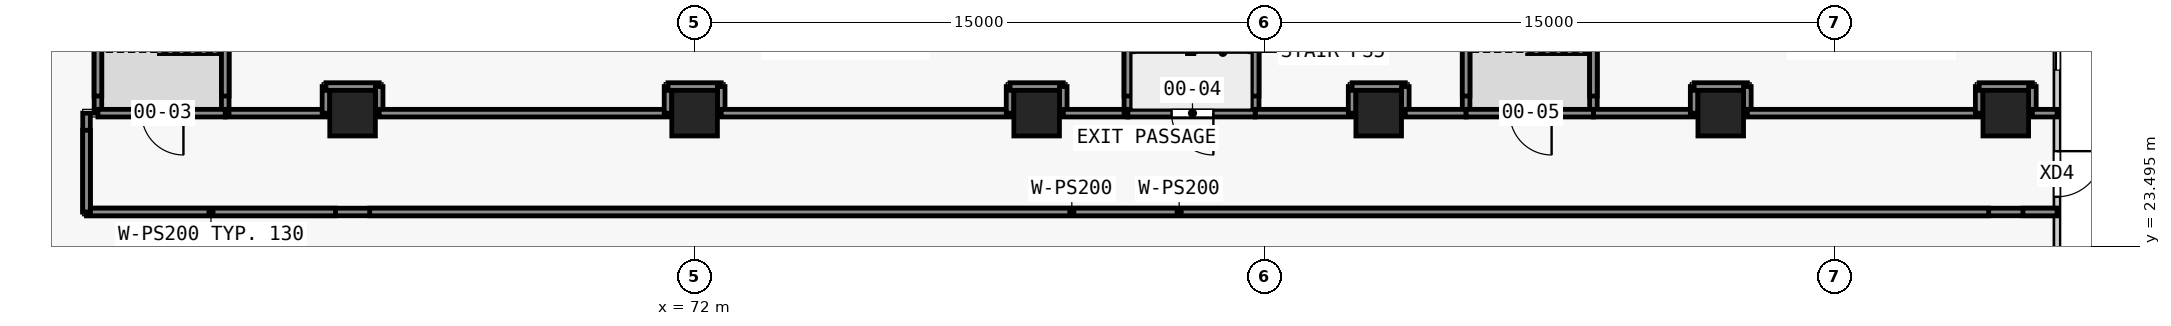
"""IFC4 building model, lengths in metres.
Left out: names, types, materials, properties, quantities, classifications, styles, units other than length and angle.
Written with IfcOpenShell. Run it as: python <this file> out.ifc"""

import sys

from ifc_helpers import new_model, si_unit, direction, frame, frame_2d, origin, origin_2d, place, context, subcontext, project, spatial, rectangle, extrude, element, fill, save


model = new_model("IFC4")
c1 = context("Model", 3, precision=1e-05, world=origin(), true_north=direction((0.0, 1.0)))
c2 = subcontext(c1, "Body", "Model", "MODEL_VIEW")
j1 = project(units=[si_unit("LENGTHUNIT", "METRE"), si_unit("PLANEANGLEUNIT", "RADIAN")], contexts=[c1])
p1 = place(None, origin())
s1 = spatial("IfcSite", under=j1, at=p1, CompositionType="ELEMENT")
p2 = place(p1, origin())
s2 = spatial("IfcBuilding", under=s1, at=p2, CompositionType="ELEMENT")
p3 = place(p2, origin())
s3 = spatial("IfcBuildingStorey", under=s2, at=p3, CompositionType="ELEMENT", Elevation=0.0)
for number, where, z_axis, x_axis in (
    (1, (63.0, 27.0, 0.0), (0.0, 0.0, 1.0), (1.0, 0.0, 0.0)),
    (2, (72.0, 27.0, 0.0), (0.0, 0.0, 1.0), (1.0, 0.0, 0.0)),
    (3, (81.0, 27.0, 0.0), (0.0, 0.0, 1.0), (1.0, 0.0, 0.0)),
    (4, (90.0, 27.0, 0.0), (0.0, 0.0, 1.0), (1.0, 0.0, 0.0)),
    (5, (99.0, 27.0, 0.0), (0.0, 0.0, 1.0), (1.0, 0.0, 0.0)),
    (6, (106.5, 27.0, 0.0), (0.0, 0.0, 1.0), (1.0, 0.0, 0.0)),
):
    element("IfcColumn", number, at=place(p3, frame(where, z_axis=z_axis, x_axis=x_axis)), inside=s3, PredefinedType="COLUMN", context=c2, shape_type="SweptSolid", body=[
        extrude(rectangle(XDim=1.2, YDim=1.2, at=origin_2d()), origin(), (0.0, 0.0, 1.0), 8.0),
    ])
p4 = place(p3, frame((107.85, 34.375, 0.0), z_axis=(0.0, 0.0, 1.0), x_axis=(0.0, -1.0, 0.0)))
e7 = element("IfcWall", 7, at=p4, inside=s3, PredefinedType="STANDARD", context=c2, shape_type="SweptSolid", body=[
    extrude(rectangle(XDim=13.485, YDim=0.16, at=frame_2d((6.743, 0.0))), origin(), (0.0, 0.0, 1.0), 7.65),
])
p5 = place(p4, frame((0.242, 0.0, 0.0)))
e8 = element("IfcOpeningElement", 8, at=p5, cuts=e7, PredefinedType="OPENING", context=c2, shape_type="SweptSolid", body=[
    extrude(rectangle(XDim=3.0, YDim=3.0, at=frame_2d((1.5, 1.5))), frame((0.0, 0.09, 0.0), z_axis=(0.0, -1.0, 0.0), x_axis=(1.0, 0.0, 0.0)), (0.0, 0.0, 1.0), 0.18),
])
p6 = place(p4, frame((3.242, 0.0, 0.0)))
e9 = element("IfcOpeningElement", 9, at=p6, cuts=e7, PredefinedType="OPENING", context=c2, shape_type="SweptSolid", body=[
    extrude(rectangle(XDim=3.0, YDim=3.0, at=frame_2d((1.5, 1.5))), frame((0.0, 0.09, 0.0), z_axis=(0.0, -1.0, 0.0), x_axis=(1.0, 0.0, 0.0)), (0.0, 0.0, 1.0), 0.18),
])
p7 = place(p4, frame((8.375, 0.0, 0.0)))
e10 = element("IfcOpeningElement", 10, at=p7, cuts=e7, PredefinedType="OPENING", context=c2, shape_type="SweptSolid", body=[
    extrude(rectangle(XDim=1.2, YDim=2.4, at=frame_2d((0.6, 1.2))), frame((0.0, 0.09, 0.0), z_axis=(0.0, -1.0, 0.0), x_axis=(1.0, 0.0, 0.0)), (0.0, 0.0, 1.0), 0.18),
])
p8 = place(p3, frame((107.85, 24.4, 0.0), z_axis=(0.0, 0.0, 1.0), x_axis=(-1.0, 0.0, 0.0)))
e11 = element("IfcWall", 11, at=p8, inside=s3, PredefinedType="PARTITIONING", context=c2, shape_type="SweptSolid", body=[
    extrude(rectangle(XDim=51.85, YDim=0.2, at=frame_2d((25.925, 0.0))), origin(), (0.0, 0.0, 1.0), 6.95),
])
p9 = place(p3, frame((59.65, 27.0, 0.0), z_axis=(0.0, 0.0, 1.0), x_axis=(1.0, 0.0, 0.0)))
e12 = element("IfcWall", 12, at=p9, inside=s3, PredefinedType="PARTITIONING", context=c2, shape_type="SweptSolid", body=[
    extrude(rectangle(XDim=2.65, YDim=0.2, at=frame_2d((1.325, 0.0))), origin(), (0.0, 0.0, 1.0), 6.95),
])
p10 = place(p3, frame((62.3, 27.0, 0.0), z_axis=(0.0, 0.0, 1.0), x_axis=(0.0, 1.0, 0.0)))
e13 = element("IfcWall", 13, at=p10, inside=s3, PredefinedType="PARTITIONING", context=c2, shape_type="SweptSolid", body=[
    extrude(rectangle(XDim=0.7, YDim=0.2, at=frame_2d((0.35, 0.0))), origin(), (0.0, 0.0, 1.0), 6.95),
])
p11 = place(p3, frame((62.3, 27.7, 0.0), z_axis=(0.0, 0.0, 1.0), x_axis=(1.0, 0.0, 0.0)))
e14 = element("IfcWall", 14, at=p11, inside=s3, PredefinedType="PARTITIONING", context=c2, shape_type="SweptSolid", body=[
    extrude(rectangle(XDim=1.4, YDim=0.2, at=frame_2d((0.7, 0.0))), origin(), (0.0, 0.0, 1.0), 6.95),
])
p12 = place(p3, frame((63.7, 27.7, 0.0), z_axis=(0.0, 0.0, 1.0), x_axis=(0.0, -1.0, 0.0)))
e15 = element("IfcWall", 15, at=p12, inside=s3, PredefinedType="PARTITIONING", context=c2, shape_type="SweptSolid", body=[
    extrude(rectangle(XDim=0.7, YDim=0.2, at=frame_2d((0.35, 0.0))), origin(), (0.0, 0.0, 1.0), 6.95),
])
p13 = place(p3, frame((63.7, 27.0, 0.0), z_axis=(0.0, 0.0, 1.0), x_axis=(1.0, 0.0, 0.0)))
e16 = element("IfcWall", 16, at=p13, inside=s3, PredefinedType="PARTITIONING", context=c2, shape_type="SweptSolid", body=[
    extrude(rectangle(XDim=7.6, YDim=0.2, at=frame_2d((3.8, 0.0))), origin(), (0.0, 0.0, 1.0), 6.95),
])
p14 = place(p3, frame((71.3, 27.0, 0.0), z_axis=(0.0, 0.0, 1.0), x_axis=(0.0, 1.0, 0.0)))
e17 = element("IfcWall", 17, at=p14, inside=s3, PredefinedType="PARTITIONING", context=c2, shape_type="SweptSolid", body=[
    extrude(rectangle(XDim=0.7, YDim=0.2, at=frame_2d((0.35, 0.0))), origin(), (0.0, 0.0, 1.0), 6.95),
])
p15 = place(p3, frame((71.3, 27.7, 0.0), z_axis=(0.0, 0.0, 1.0), x_axis=(1.0, 0.0, 0.0)))
e18 = element("IfcWall", 18, at=p15, inside=s3, PredefinedType="PARTITIONING", context=c2, shape_type="SweptSolid", body=[
    extrude(rectangle(XDim=1.4, YDim=0.2, at=frame_2d((0.7, 0.0))), origin(), (0.0, 0.0, 1.0), 6.95),
])
p16 = place(p3, frame((72.7, 27.7, 0.0), z_axis=(0.0, 0.0, 1.0), x_axis=(0.0, -1.0, 0.0)))
e19 = element("IfcWall", 19, at=p16, inside=s3, PredefinedType="PARTITIONING", context=c2, shape_type="SweptSolid", body=[
    extrude(rectangle(XDim=0.7, YDim=0.2, at=frame_2d((0.35, 0.0))), origin(), (0.0, 0.0, 1.0), 6.95),
])
p17 = place(p3, frame((72.7, 27.0, 0.0), z_axis=(0.0, 0.0, 1.0), x_axis=(1.0, 0.0, 0.0)))
e20 = element("IfcWall", 20, at=p17, inside=s3, PredefinedType="PARTITIONING", context=c2, shape_type="SweptSolid", body=[
    extrude(rectangle(XDim=7.6, YDim=0.2, at=frame_2d((3.8, 0.0))), origin(), (0.0, 0.0, 1.0), 6.95),
])
p18 = place(p3, frame((80.3, 27.0, 0.0), z_axis=(0.0, 0.0, 1.0), x_axis=(0.0, 1.0, 0.0)))
e21 = element("IfcWall", 21, at=p18, inside=s3, PredefinedType="PARTITIONING", context=c2, shape_type="SweptSolid", body=[
    extrude(rectangle(XDim=0.7, YDim=0.2, at=frame_2d((0.35, 0.0))), origin(), (0.0, 0.0, 1.0), 6.95),
])
p19 = place(p3, frame((80.3, 27.7, 0.0), z_axis=(0.0, 0.0, 1.0), x_axis=(1.0, 0.0, 0.0)))
e22 = element("IfcWall", 22, at=p19, inside=s3, PredefinedType="PARTITIONING", context=c2, shape_type="SweptSolid", body=[
    extrude(rectangle(XDim=1.4, YDim=0.2, at=frame_2d((0.7, 0.0))), origin(), (0.0, 0.0, 1.0), 6.95),
])
p20 = place(p3, frame((81.7, 27.7, 0.0), z_axis=(0.0, 0.0, 1.0), x_axis=(0.0, -1.0, 0.0)))
e23 = element("IfcWall", 23, at=p20, inside=s3, PredefinedType="PARTITIONING", context=c2, shape_type="SweptSolid", body=[
    extrude(rectangle(XDim=0.7, YDim=0.2, at=frame_2d((0.35, 0.0))), origin(), (0.0, 0.0, 1.0), 6.95),
])
p21 = place(p3, frame((81.7, 27.0, 0.0), z_axis=(0.0, 0.0, 1.0), x_axis=(1.0, 0.0, 0.0)))
e24 = element("IfcWall", 24, at=p21, inside=s3, PredefinedType="PARTITIONING", context=c2, shape_type="SweptSolid", body=[
    extrude(rectangle(XDim=1.7, YDim=0.2, at=frame_2d((0.85, 0.0))), origin(), (0.0, 0.0, 1.0), 6.95),
])
for number, where, z_axis, x_axis in (
    (25, (56.3, 27.0, 0.0), (0.0, 0.0, 1.0), (0.0, 1.0, 0.0)),
    (26, (59.65, 33.9, 0.0), (0.0, 0.0, 1.0), (0.0, -1.0, 0.0)),
    (27, (92.3, 27.0, 0.0), (0.0, 0.0, 1.0), (0.0, 1.0, 0.0)),
    (28, (95.65, 33.9, 0.0), (0.0, 0.0, 1.0), (0.0, -1.0, 0.0)),
    (29, (83.4, 27.0, 0.0), (0.0, 0.0, 1.0), (0.0, 1.0, 0.0)),
    (30, (86.75, 33.9, 0.0), (0.0, 0.0, 1.0), (0.0, -1.0, 0.0)),
):
    element("IfcWall", number, at=place(p3, frame(where, z_axis=z_axis, x_axis=x_axis)), inside=s3, PredefinedType="PARTITIONING", context=c2, shape_type="SweptSolid", body=[
        extrude(rectangle(XDim=6.9, YDim=0.2, at=frame_2d((3.45, 0.0))), origin(), (0.0, 0.0, 1.0), 6.95),
    ])
p22 = place(p3, frame((95.65, 27.0, 0.0), z_axis=(0.0, 0.0, 1.0), x_axis=(1.0, 0.0, 0.0)))
e31 = element("IfcWall", 31, at=p22, inside=s3, PredefinedType="PARTITIONING", context=c2, shape_type="SweptSolid", body=[
    extrude(rectangle(XDim=2.65, YDim=0.2, at=frame_2d((1.325, 0.0))), origin(), (0.0, 0.0, 1.0), 6.95),
])
p23 = place(p3, frame((98.3, 27.0, 0.0), z_axis=(0.0, 0.0, 1.0), x_axis=(0.0, 1.0, 0.0)))
e32 = element("IfcWall", 32, at=p23, inside=s3, PredefinedType="PARTITIONING", context=c2, shape_type="SweptSolid", body=[
    extrude(rectangle(XDim=0.7, YDim=0.2, at=frame_2d((0.35, 0.0))), origin(), (0.0, 0.0, 1.0), 6.95),
])
p24 = place(p3, frame((98.3, 27.7, 0.0), z_axis=(0.0, 0.0, 1.0), x_axis=(1.0, 0.0, 0.0)))
e33 = element("IfcWall", 33, at=p24, inside=s3, PredefinedType="PARTITIONING", context=c2, shape_type="SweptSolid", body=[
    extrude(rectangle(XDim=1.4, YDim=0.2, at=frame_2d((0.7, 0.0))), origin(), (0.0, 0.0, 1.0), 6.95),
])
p25 = place(p3, frame((99.7, 27.7, 0.0), z_axis=(0.0, 0.0, 1.0), x_axis=(0.0, -1.0, 0.0)))
e34 = element("IfcWall", 34, at=p25, inside=s3, PredefinedType="PARTITIONING", context=c2, shape_type="SweptSolid", body=[
    extrude(rectangle(XDim=0.7, YDim=0.2, at=frame_2d((0.35, 0.0))), origin(), (0.0, 0.0, 1.0), 6.95),
])
p26 = place(p3, frame((99.7, 27.0, 0.0), z_axis=(0.0, 0.0, 1.0), x_axis=(1.0, 0.0, 0.0)))
e35 = element("IfcWall", 35, at=p26, inside=s3, PredefinedType="PARTITIONING", context=c2, shape_type="SweptSolid", body=[
    extrude(rectangle(XDim=6.1, YDim=0.2, at=frame_2d((3.05, 0.0))), origin(), (0.0, 0.0, 1.0), 6.95),
])
p27 = place(p3, frame((105.8, 27.0, 0.0), z_axis=(0.0, 0.0, 1.0), x_axis=(0.0, 1.0, 0.0)))
e36 = element("IfcWall", 36, at=p27, inside=s3, PredefinedType="PARTITIONING", context=c2, shape_type="SweptSolid", body=[
    extrude(rectangle(XDim=0.7, YDim=0.2, at=frame_2d((0.35, 0.0))), origin(), (0.0, 0.0, 1.0), 6.95),
])
p28 = place(p3, frame((105.8, 27.7, 0.0), z_axis=(0.0, 0.0, 1.0), x_axis=(1.0, 0.0, 0.0)))
e37 = element("IfcWall", 37, at=p28, inside=s3, PredefinedType="PARTITIONING", context=c2, shape_type="SweptSolid", body=[
    extrude(rectangle(XDim=1.4, YDim=0.2, at=frame_2d((0.7, 0.0))), origin(), (0.0, 0.0, 1.0), 6.95),
])
p29 = place(p3, frame((107.2, 27.7, 0.0), z_axis=(0.0, 0.0, 1.0), x_axis=(0.0, -1.0, 0.0)))
e38 = element("IfcWall", 38, at=p29, inside=s3, PredefinedType="PARTITIONING", context=c2, shape_type="SweptSolid", body=[
    extrude(rectangle(XDim=0.7, YDim=0.2, at=frame_2d((0.35, 0.0))), origin(), (0.0, 0.0, 1.0), 7.65),
])
p30 = place(p3, frame((107.2, 27.0, 0.0), z_axis=(0.0, 0.0, 1.0), x_axis=(1.0, 0.0, 0.0)))
e39 = element("IfcWall", 39, at=p30, inside=s3, PredefinedType="PARTITIONING", context=c2, shape_type="SweptSolid", body=[
    extrude(rectangle(XDim=0.65, YDim=0.2, at=frame_2d((0.325, 0.0))), origin(), (0.0, 0.0, 1.0), 7.65),
])
p31 = place(p3, frame((86.75, 27.0, 0.0), z_axis=(0.0, 0.0, 1.0), x_axis=(1.0, 0.0, 0.0)))
e40 = element("IfcWall", 40, at=p31, inside=s3, PredefinedType="PARTITIONING", context=c2, shape_type="SweptSolid", body=[
    extrude(rectangle(XDim=2.55, YDim=0.2, at=frame_2d((1.275, 0.0))), origin(), (0.0, 0.0, 1.0), 6.95),
])
p32 = place(p3, frame((89.3, 27.0, 0.0), z_axis=(0.0, 0.0, 1.0), x_axis=(0.0, 1.0, 0.0)))
e41 = element("IfcWall", 41, at=p32, inside=s3, PredefinedType="PARTITIONING", context=c2, shape_type="SweptSolid", body=[
    extrude(rectangle(XDim=0.7, YDim=0.2, at=frame_2d((0.35, 0.0))), origin(), (0.0, 0.0, 1.0), 6.95),
])
p33 = place(p3, frame((89.3, 27.7, 0.0), z_axis=(0.0, 0.0, 1.0), x_axis=(1.0, 0.0, 0.0)))
e42 = element("IfcWall", 42, at=p33, inside=s3, PredefinedType="PARTITIONING", context=c2, shape_type="SweptSolid", body=[
    extrude(rectangle(XDim=1.4, YDim=0.2, at=frame_2d((0.7, 0.0))), origin(), (0.0, 0.0, 1.0), 6.95),
])
p34 = place(p3, frame((90.7, 27.7, 0.0), z_axis=(0.0, 0.0, 1.0), x_axis=(0.0, -1.0, 0.0)))
e43 = element("IfcWall", 43, at=p34, inside=s3, PredefinedType="PARTITIONING", context=c2, shape_type="SweptSolid", body=[
    extrude(rectangle(XDim=0.7, YDim=0.2, at=frame_2d((0.35, 0.0))), origin(), (0.0, 0.0, 1.0), 6.95),
])
p35 = place(p3, frame((90.7, 27.0, 0.0), z_axis=(0.0, 0.0, 1.0), x_axis=(1.0, 0.0, 0.0)))
e44 = element("IfcWall", 44, at=p35, inside=s3, PredefinedType="PARTITIONING", context=c2, shape_type="SweptSolid", body=[
    extrude(rectangle(XDim=1.6, YDim=0.2, at=frame_2d((0.8, 0.0))), origin(), (0.0, 0.0, 1.0), 6.95),
])
p36 = place(p3, frame((86.75, 27.0, 0.0), z_axis=(0.0, 0.0, 1.0), x_axis=(-1.0, 0.0, 0.0)))
e45 = element("IfcWall", 45, at=p36, inside=s3, PredefinedType="PARTITIONING", context=c2, shape_type="SweptSolid", body=[
    extrude(rectangle(XDim=3.35, YDim=0.2, at=frame_2d((1.675, 0.0))), origin(), (0.0, 0.0, 1.0), 6.95),
])
p37 = place(p36, frame((1.1, 0.0, 0.0)))
e46 = element("IfcOpeningElement", 46, at=p37, cuts=e45, PredefinedType="OPENING", context=c2, shape_type="SweptSolid", body=[
    extrude(rectangle(XDim=1.1, YDim=2.1, at=frame_2d((0.55, 1.05))), frame((0.0, 0.11, 0.0), z_axis=(0.0, -1.0, 0.0), x_axis=(1.0, 0.0, 0.0)), (0.0, 0.0, 1.0), 0.22),
])
p38 = place(p3, frame((59.65, 27.0, 0.0), z_axis=(0.0, 0.0, 1.0), x_axis=(-1.0, 0.0, 0.0)))
e47 = element("IfcWall", 47, at=p38, inside=s3, PredefinedType="PARTITIONING", context=c2, shape_type="SweptSolid", body=[
    extrude(rectangle(XDim=3.35, YDim=0.2, at=frame_2d((1.675, 0.0))), origin(), (0.0, 0.0, 1.0), 6.95),
])
p39 = place(p38, frame((1.1, 0.0, 0.0)))
e48 = element("IfcOpeningElement", 48, at=p39, cuts=e47, PredefinedType="OPENING", context=c2, shape_type="SweptSolid", body=[
    extrude(rectangle(XDim=1.1, YDim=2.1, at=frame_2d((0.55, 1.05))), frame((0.0, 0.11, 0.0), z_axis=(0.0, -1.0, 0.0), x_axis=(1.0, 0.0, 0.0)), (0.0, 0.0, 1.0), 0.22),
])
p40 = place(p3, frame((95.65, 27.0, 0.0), z_axis=(0.0, 0.0, 1.0), x_axis=(-1.0, 0.0, 0.0)))
e49 = element("IfcWall", 49, at=p40, inside=s3, PredefinedType="PARTITIONING", context=c2, shape_type="SweptSolid", body=[
    extrude(rectangle(XDim=3.35, YDim=0.2, at=frame_2d((1.675, 0.0))), origin(), (0.0, 0.0, 1.0), 6.95),
])
p41 = place(p40, frame((1.1, 0.0, 0.0)))
e50 = element("IfcOpeningElement", 50, at=p41, cuts=e49, PredefinedType="OPENING", context=c2, shape_type="SweptSolid", body=[
    extrude(rectangle(XDim=1.1, YDim=2.1, at=frame_2d((0.55, 1.05))), frame((0.0, 0.11, 0.0), z_axis=(0.0, -1.0, 0.0), x_axis=(1.0, 0.0, 0.0)), (0.0, 0.0, 1.0), 0.22),
])
p42 = place(p3, frame((56.0, 24.4, 0.0), z_axis=(0.0, 0.0, 1.0), x_axis=(0.0, 1.0, 0.0)))
e51 = element("IfcWall", 51, at=p42, inside=s3, PredefinedType="PARTITIONING", context=c2, shape_type="SweptSolid", body=[
    extrude(rectangle(XDim=2.6, YDim=0.2, at=frame_2d((1.3, 0.0))), origin(), (0.0, 0.0, 1.0), 6.95),
])
p43 = place(p3, frame((107.85, 24.4, 6.95), z_axis=(0.0, 0.0, 1.0), x_axis=(-1.0, 0.0, 0.0)))
e52 = element("IfcWall", 52, at=p43, inside=s3, PredefinedType="PARTITIONING", context=c2, shape_type="SweptSolid", body=[
    extrude(rectangle(XDim=0.9, YDim=0.2, at=frame_2d((0.45, 0.0))), origin(), (0.0, 0.0, 1.0), 0.7),
])
p44 = place(p3, frame((106.05, 24.4, 6.95), z_axis=(0.0, 0.0, 1.0), x_axis=(-1.0, 0.0, 0.0)))
e53 = element("IfcWall", 53, at=p44, inside=s3, PredefinedType="PARTITIONING", context=c2, shape_type="SweptSolid", body=[
    extrude(rectangle(XDim=42.6, YDim=0.2, at=frame_2d((21.3, 0.0))), origin(), (0.0, 0.0, 1.0), 0.7),
])
p45 = place(p3, frame((62.55, 24.4, 6.95), z_axis=(0.0, 0.0, 1.0), x_axis=(-1.0, 0.0, 0.0)))
e54 = element("IfcWall", 54, at=p45, inside=s3, PredefinedType="PARTITIONING", context=c2, shape_type="SweptSolid", body=[
    extrude(rectangle(XDim=6.55, YDim=0.2, at=frame_2d((3.275, 0.0))), origin(), (0.0, 0.0, 1.0), 0.7),
])
for number, where, z_axis, x_axis in (
    (55, (56.3, 27.45, 6.95), (0.0, 0.0, 1.0), (0.0, 1.0, 0.0)),
    (56, (59.65, 33.9, 6.95), (0.0, 0.0, 1.0), (0.0, -1.0, 0.0)),
    (57, (92.3, 27.45, 6.95), (0.0, 0.0, 1.0), (0.0, 1.0, 0.0)),
    (58, (95.65, 33.9, 6.95), (0.0, 0.0, 1.0), (0.0, -1.0, 0.0)),
    (59, (83.4, 27.45, 6.95), (0.0, 0.0, 1.0), (0.0, 1.0, 0.0)),
    (60, (86.75, 33.9, 6.95), (0.0, 0.0, 1.0), (0.0, -1.0, 0.0)),
):
    element("IfcWall", number, at=place(p3, frame(where, z_axis=z_axis, x_axis=x_axis)), inside=s3, PredefinedType="PARTITIONING", context=c2, shape_type="SweptSolid", body=[
        extrude(rectangle(XDim=6.45, YDim=0.2, at=frame_2d((3.225, 0.0))), origin(), (0.0, 0.0, 1.0), 0.7),
    ])
p46 = place(p3, frame((56.0, 24.4, 6.95), z_axis=(0.0, 0.0, 1.0), x_axis=(0.0, 1.0, 0.0)))
e61 = element("IfcWall", 61, at=p46, inside=s3, PredefinedType="PARTITIONING", context=c2, shape_type="SweptSolid", body=[
    extrude(rectangle(XDim=2.15, YDim=0.2, at=frame_2d((1.075, 0.0))), origin(), (0.0, 0.0, 1.0), 0.7),
])
p47 = place(p6, origin())
e62 = element("IfcDoor", 62, at=p47, inside=s3, OperationType="SINGLE_SWING_LEFT", PredefinedType="DOOR", context=c2, shape_type="SweptSolid", body=[
    extrude(rectangle(XDim=3.0, YDim=3.0, at=frame_2d((1.5, 1.5))), frame((0.0, 0.025, 0.0), z_axis=(0.0, -1.0, 0.0), x_axis=(1.0, 0.0, 0.0)), (0.0, 0.0, 1.0), 0.05),
])
fill(e9, e62)
p48 = place(p7, origin())
e63 = element("IfcDoor", 63, at=p48, inside=s3, OperationType="SINGLE_SWING_LEFT", PredefinedType="DOOR", context=c2, shape_type="SweptSolid", body=[
    extrude(rectangle(XDim=1.2, YDim=2.4, at=frame_2d((0.6, 1.2))), frame((0.0, 0.025, 0.0), z_axis=(0.0, -1.0, 0.0), x_axis=(1.0, 0.0, 0.0)), (0.0, 0.0, 1.0), 0.05),
])
fill(e10, e63)
p49 = place(p39, origin())
e64 = element("IfcDoor", 64, at=p49, inside=s3, OperationType="SINGLE_SWING_LEFT", PredefinedType="DOOR", context=c2, shape_type="SweptSolid", body=[
    extrude(rectangle(XDim=1.1, YDim=2.1, at=frame_2d((0.55, 1.05))), frame((0.0, 0.025, 0.0), z_axis=(0.0, -1.0, 0.0), x_axis=(1.0, 0.0, 0.0)), (0.0, 0.0, 1.0), 0.05),
])
fill(e48, e64)
p50 = place(p37, origin())
e65 = element("IfcDoor", 65, at=p50, inside=s3, OperationType="SINGLE_SWING_LEFT", PredefinedType="DOOR", context=c2, shape_type="SweptSolid", body=[
    extrude(rectangle(XDim=1.1, YDim=2.1, at=frame_2d((0.55, 1.05))), frame((0.0, 0.025, 0.0), z_axis=(0.0, -1.0, 0.0), x_axis=(1.0, 0.0, 0.0)), (0.0, 0.0, 1.0), 0.05),
])
fill(e46, e65)
p51 = place(p41, origin())
e66 = element("IfcDoor", 66, at=p51, inside=s3, OperationType="SINGLE_SWING_LEFT", PredefinedType="DOOR", context=c2, shape_type="SweptSolid", body=[
    extrude(rectangle(XDim=1.1, YDim=2.1, at=frame_2d((0.55, 1.05))), frame((0.0, 0.025, 0.0), z_axis=(0.0, -1.0, 0.0), x_axis=(1.0, 0.0, 0.0)), (0.0, 0.0, 1.0), 0.05),
])
fill(e50, e66)
save(model, sys.argv[1])
